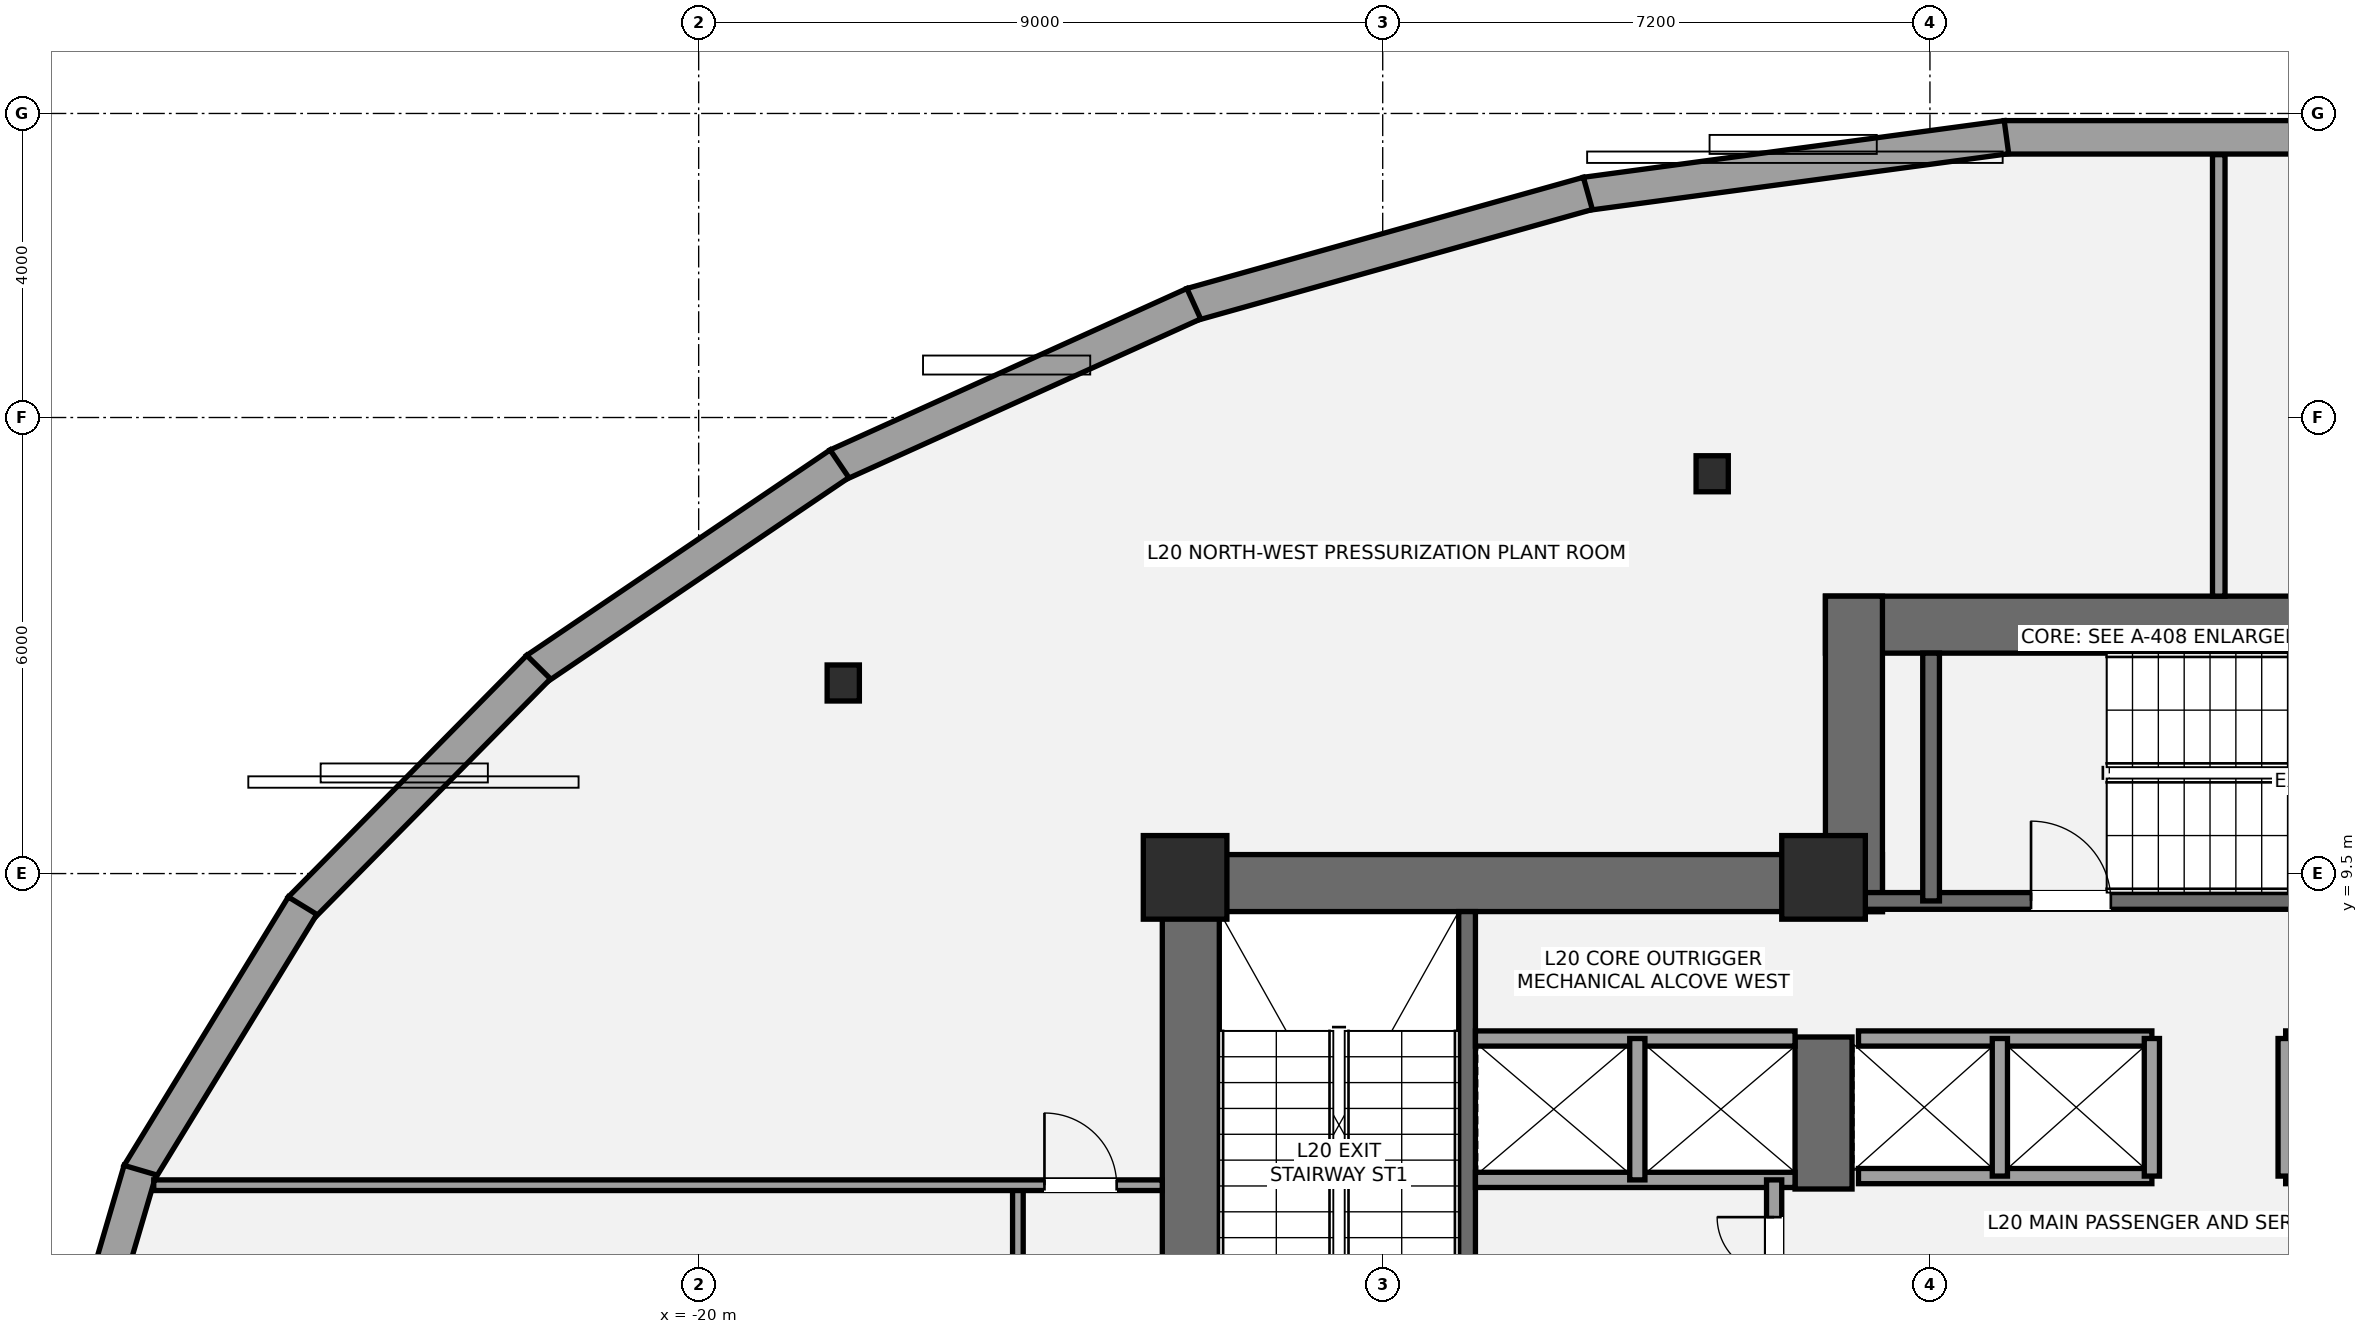
"""IFC4 building model, lengths in metres.
Left out: names, types, materials, properties, quantities, classifications, styles, units other than length and angle.
Written with IfcOpenShell. Run it as: python <this file> out.ifc"""

import sys

from ifc_helpers import new_model, si_unit, direction, frame, frame_2d, origin, origin_2d, place, context, subcontext, project, spatial, rectangle, i_section, extrude, element, fill, save


model = new_model("IFC4")
c1 = context("Model", 3, precision=1e-05, world=origin(), true_north=direction((0.0, 1.0)))
c2 = subcontext(c1, "Body", "Model", "MODEL_VIEW")
j1 = project(units=[si_unit("LENGTHUNIT", "METRE"), si_unit("PLANEANGLEUNIT", "RADIAN")], contexts=[c1])
p1 = place(None, origin())
s1 = spatial("IfcSite", under=j1, at=p1, CompositionType="ELEMENT")
p2 = place(p1, origin())
s2 = spatial("IfcBuilding", under=s1, at=p2, CompositionType="ELEMENT")
p3 = place(p2, frame((0.0, 0.0, 77.4)))
s3 = spatial("IfcBuildingStorey", under=s2, at=p3, CompositionType="ELEMENT", Elevation=77.4)
p4 = place(p3, frame((-13.525, 1.1, 0.0), z_axis=(0.0, 0.0, 1.0), x_axis=(0.0, 1.0, 0.0)))
e1 = element("IfcWall", 1, at=p4, inside=s3, PredefinedType="SHEAR", context=c2, shape_type="SweptSolid", body=[
    extrude(rectangle(XDim=8.65, YDim=0.75, at=frame_2d((4.325, 0.0))), origin(), (0.0, 0.0, 1.0), 4.5),
])
p5 = place(p3, frame((-13.9, 9.375, 0.0), z_axis=(0.0, 0.0, 1.0), x_axis=(1.0, 0.0, 0.0)))
e2 = element("IfcWall", 2, at=p5, inside=s3, PredefinedType="SHEAR", context=c2, shape_type="SweptSolid", body=[
    extrude(rectangle(XDim=9.475, YDim=0.75, at=frame_2d((4.737, 0.0))), origin(), (0.0, 0.0, 1.0), 4.5),
])
p6 = place(p3, frame((-5.2, 5.35, 0.0), z_axis=(0.0, 0.0, 1.0), x_axis=(0.0, 1.0, 0.0)))
e3 = element("IfcWall", 3, at=p6, inside=s3, PredefinedType="SHEAR", context=c2, shape_type="SweptSolid", body=[
    extrude(rectangle(XDim=2.0, YDim=0.75, at=frame_2d((1.0, 0.0))), origin(), (0.0, 0.0, 1.0), 4.5),
])
p7 = place(p3, frame((-9.89, 1.85, 0.0), z_axis=(0.0, 0.0, 1.0), x_axis=(0.0, 1.0, 0.0)))
e4 = element("IfcWall", 4, at=p7, inside=s3, PredefinedType="SHEAR", context=c2, shape_type="SweptSolid", body=[
    extrude(rectangle(XDim=7.15, YDim=0.22, at=frame_2d((3.575, 0.0))), origin(), (0.0, 0.0, 1.0), 4.5),
])
p8 = place(p3, frame((-5.175, 12.775, 0.0), z_axis=(0.0, 0.0, 1.0), x_axis=(1.0, 0.0, 0.0)))
e5 = element("IfcWall", 5, at=p8, inside=s3, PredefinedType="SHEAR", context=c2, shape_type="SweptSolid", body=[
    extrude(rectangle(XDim=10.35, YDim=0.75, at=frame_2d((5.175, 0.0))), origin(), (0.0, 0.0, 1.0), 4.5),
])
p9 = place(p3, frame((-4.8, 9.0, 0.0), z_axis=(0.0, 0.0, 1.0), x_axis=(0.0, 1.0, 0.0)))
e6 = element("IfcWall", 6, at=p9, inside=s3, PredefinedType="SHEAR", context=c2, shape_type="SweptSolid", body=[
    extrude(rectangle(XDim=4.15, YDim=0.75, at=frame_2d((2.075, 0.0))), origin(), (0.0, 0.0, 1.0), 4.5),
])
p10 = place(p3, frame((-4.7, 9.14, 0.0), z_axis=(0.0, 0.0, 1.0), x_axis=(1.0, 0.0, 0.0)))
e7 = element("IfcWall", 7, at=p10, inside=s3, PredefinedType="SHEAR", context=c2, shape_type="SweptSolid", body=[
    extrude(rectangle(XDim=9.3, YDim=0.22, at=frame_2d((4.65, 0.0))), origin(), (0.0, 0.0, 1.0), 4.5),
])
p11 = place(p10, frame((2.23, 0.0, 0.0)))
e8 = element("IfcOpeningElement", 8, at=p11, cuts=e7, PredefinedType="OPENING", context=c2, shape_type="SweptSolid", body=[
    extrude(rectangle(XDim=1.05, YDim=2.15, at=frame_2d((0.525, 1.075))), frame((0.0, 0.12, 0.0), z_axis=(0.0, -1.0, 0.0), x_axis=(1.0, 0.0, 0.0)), (0.0, 0.0, 1.0), 0.24),
])
p12 = place(p3, frame((-3.785, 9.14, 0.0), z_axis=(0.0, 0.0, 1.0), x_axis=(0.0, 1.0, 0.0)))
e9 = element("IfcWall", 9, at=p12, inside=s3, PredefinedType="SHEAR", context=c2, shape_type="SweptSolid", body=[
    extrude(rectangle(XDim=3.26, YDim=0.22, at=frame_2d((1.63, 0.0))), origin(), (0.0, 0.0, 1.0), 4.5),
])
for number, where, z_axis, x_axis in (
    (10, (-13.6, 9.45, 0.0), (0.0, 0.0, 1.0), (1.0, 0.0, 0.0)),
    (11, (-5.2, 9.45, 0.0), (0.0, 0.0, 1.0), (1.0, 0.0, 0.0)),
):
    element("IfcColumn", number, at=place(p3, frame(where, z_axis=z_axis, x_axis=x_axis)), inside=s3, PredefinedType="COLUMN", context=c2, shape_type="SweptSolid", body=[
        extrude(rectangle(XDim=1.1, YDim=1.1, at=origin_2d()), origin(), (0.0, 0.0, 1.0), 4.5),
    ])
for number, where, z_axis, x_axis in (
    (12, (-6.665, 14.76, 0.0), (0.0, 0.0, 1.0), (1.0, 0.0, 0.0)),
    (13, (-18.098, 12.007, 0.0), (0.0, 0.0, 1.0), (1.0, 0.0, 0.0)),
):
    element("IfcColumn", number, at=place(p3, frame(where, z_axis=z_axis, x_axis=x_axis)), inside=s3, PredefinedType="COLUMN", context=c2, shape_type="SweptSolid", body=[
        extrude(i_section(OverallWidth=0.424, OverallDepth=0.474, WebThickness=0.048, FlangeThickness=0.077, at=origin_2d()), origin(), (0.0, 0.0, 1.0), 4.5),
    ])
p13 = place(p3, frame((-2.823, 19.186, 0.0), z_axis=(0.0, 0.0, 1.0), x_axis=(1.0, 0.0, 0.0)))
e14 = element("IfcWall", 14, at=p13, inside=s3, PredefinedType="STANDARD", context=c2, shape_type="SweptSolid", body=[
    extrude(rectangle(XDim=5.646, YDim=0.44, at=frame_2d((2.823, 0.0))), origin(), (0.0, 0.0, 1.0), 3.498),
])
p14 = place(p3, frame((-8.331, 18.442, 0.0), z_axis=(0.0, 0.0, 1.0), x_axis=(0.9910561058, 0.133445851026, 0.0)))
e15 = element("IfcWall", 15, at=p14, inside=s3, PredefinedType="STANDARD", context=c2, shape_type="SweptSolid", body=[
    extrude(rectangle(XDim=5.587, YDim=0.44, at=frame_2d((2.794, 0.0))), origin(), (0.0, 0.0, 1.0), 3.498),
])
p15 = place(p3, frame((-13.517, 16.986, 0.0), z_axis=(0.0, 0.0, 1.0), x_axis=(0.962849260033, 0.270039446109, 0.0)))
e16 = element("IfcWall", 16, at=p15, inside=s3, PredefinedType="STANDARD", context=c2, shape_type="SweptSolid", body=[
    extrude(rectangle(XDim=5.417, YDim=0.44, at=frame_2d((2.708, 0.0))), origin(), (0.0, 0.0, 1.0), 3.498),
])
p16 = place(p3, frame((-18.18, 14.873, 0.0), z_axis=(0.0, 0.0, 1.0), x_axis=(0.911088856004, 0.412210014999, 0.0)))
e17 = element("IfcWall", 17, at=p16, inside=s3, PredefinedType="STANDARD", context=c2, shape_type="SweptSolid", body=[
    extrude(rectangle(XDim=5.152, YDim=0.44, at=frame_2d((2.576, 0.0))), origin(), (0.0, 0.0, 1.0), 3.498),
])
p17 = place(p3, frame((-22.139, 12.188, 0.0), z_axis=(0.0, 0.0, 1.0), x_axis=(0.82804003003, 0.560668983151, 0.0)))
e18 = element("IfcWall", 18, at=p17, inside=s3, PredefinedType="STANDARD", context=c2, shape_type="SweptSolid", body=[
    extrude(rectangle(XDim=4.821, YDim=0.44, at=frame_2d((2.411, 0.0))), origin(), (0.0, 0.0, 1.0), 3.498),
])
p18 = place(p3, frame((-25.243, 9.038, 0.0), z_axis=(0.0, 0.0, 1.0), x_axis=(0.702361901729, 0.711820032733, 0.0)))
e19 = element("IfcWall", 19, at=p18, inside=s3, PredefinedType="STANDARD", context=c2, shape_type="SweptSolid", body=[
    extrude(rectangle(XDim=4.466, YDim=0.44, at=frame_2d((2.233, 0.0))), origin(), (0.0, 0.0, 1.0), 3.498),
])
p19 = place(p3, frame((-27.372, 5.546, 0.0), z_axis=(0.0, 0.0, 1.0), x_axis=(0.521891226532, 0.85301204427, 0.0)))
e20 = element("IfcWall", 20, at=p19, inside=s3, PredefinedType="STANDARD", context=c2, shape_type="SweptSolid", body=[
    extrude(rectangle(XDim=4.14, YDim=0.44, at=frame_2d((2.07, 0.0))), origin(), (0.0, 0.0, 1.0), 3.498),
])
p20 = place(p3, frame((-28.45, 1.849, 0.0), z_axis=(0.0, 0.0, 1.0), x_axis=(0.281834819638, 0.959462940629, 0.0)))
e21 = element("IfcWall", 21, at=p20, inside=s3, PredefinedType="STANDARD", context=c2, shape_type="SweptSolid", body=[
    extrude(rectangle(XDim=3.908, YDim=0.44, at=frame_2d((1.954, 0.0))), origin(), (0.0, 0.0, 1.0), 3.498),
])
for number, where, z_axis, x_axis in (
    (22, (-9.78, 5.47, 0.0), (0.0, 0.0, 1.0), (1.0, 0.0, 0.0)),
    (23, (-9.78, 7.33, 0.0), (0.0, 0.0, 1.0), (1.0, 0.0, 0.0)),
):
    element("IfcWall", number, at=place(p3, frame(where, z_axis=z_axis, x_axis=x_axis)), inside=s3, PredefinedType="SOLIDWALL", context=c2, shape_type="SweptSolid", body=[
        extrude(rectangle(XDim=4.205, YDim=0.2, at=frame_2d((2.103, 0.0))), origin(), (0.0, 0.0, 1.0), 4.28),
    ])
p21 = place(p3, frame((-7.65, 5.47, 0.0), z_axis=(0.0, 0.0, 1.0), x_axis=(0.0, 1.0, 0.0)))
e24 = element("IfcWall", 24, at=p21, inside=s3, PredefinedType="SOLIDWALL", context=c2, shape_type="SweptSolid", body=[
    extrude(rectangle(XDim=1.86, YDim=0.2, at=frame_2d((0.93, 0.0))), origin(), (0.0, 0.0, 1.0), 4.28),
])
p22 = place(p3, frame((-5.85, 3.78, 0.0), z_axis=(0.0, 0.0, 1.0), x_axis=(0.0, 1.0, 0.0)))
e25 = element("IfcWall", 25, at=p22, inside=s3, PredefinedType="SOLIDWALL", context=c2, shape_type="SweptSolid", body=[
    extrude(rectangle(XDim=1.69, YDim=0.2, at=frame_2d((0.845, 0.0))), origin(), (0.0, 0.0, 1.0), 4.28),
])
p23 = place(p22, frame((0.45, 0.0, 0.0)))
e26 = element("IfcOpeningElement", 26, at=p23, cuts=e25, PredefinedType="OPENING", context=c2, shape_type="SweptSolid", body=[
    extrude(rectangle(XDim=0.75, YDim=2.1, at=frame_2d((0.375, 1.05))), frame((0.0, 0.11, 0.0), z_axis=(0.0, -1.0, 0.0), x_axis=(1.0, 0.0, 0.0)), (0.0, 0.0, 1.0), 0.22),
])
for number, where, z_axis, x_axis in (
    (27, (-4.74, 5.52, 0.0), (0.0, 0.0, 1.0), (1.0, 0.0, 0.0)),
    (28, (0.88, 5.52, 0.0), (0.0, 0.0, 1.0), (1.0, 0.0, 0.0)),
    (29, (-4.74, 7.33, 0.0), (0.0, 0.0, 1.0), (1.0, 0.0, 0.0)),
    (30, (0.88, 7.33, 0.0), (0.0, 0.0, 1.0), (1.0, 0.0, 0.0)),
):
    element("IfcWall", number, at=place(p3, frame(where, z_axis=z_axis, x_axis=x_axis)), inside=s3, PredefinedType="SOLIDWALL", context=c2, shape_type="SweptSolid", body=[
        extrude(rectangle(XDim=3.86, YDim=0.2, at=frame_2d((1.93, 0.0))), origin(), (0.0, 0.0, 1.0), 4.28),
    ])
for number, where, z_axis, x_axis in (
    (31, (-2.88, 5.52, 0.0), (0.0, 0.0, 1.0), (0.0, 1.0, 0.0)),
    (32, (-0.88, 5.52, 0.0), (0.0, 0.0, 1.0), (0.0, 1.0, 0.0)),
    (33, (0.88, 5.52, 0.0), (0.0, 0.0, 1.0), (0.0, 1.0, 0.0)),
):
    element("IfcWall", number, at=place(p3, frame(where, z_axis=z_axis, x_axis=x_axis)), inside=s3, PredefinedType="SOLIDWALL", context=c2, shape_type="SweptSolid", body=[
        extrude(rectangle(XDim=1.81, YDim=0.2, at=frame_2d((0.905, 0.0))), origin(), (0.0, 0.0, 1.0), 4.28),
    ])
p24 = place(p3, frame((-15.8, -5.8, 0.0), z_axis=(0.0, 0.0, 1.0), x_axis=(0.0, 1.0, 0.0)))
e34 = element("IfcWall", 34, at=p24, inside=s3, PredefinedType="PARTITIONING", context=c2, shape_type="SweptSolid", body=[
    extrude(rectangle(XDim=11.2, YDim=0.14, at=frame_2d((5.6, 0.0))), origin(), (0.0, 0.0, 1.0), 2.47),
])
p25 = place(p24, frame((0.35, 0.0, 0.0)))
e35 = element("IfcOpeningElement", 35, at=p25, cuts=e34, PredefinedType="OPENING", context=c2, shape_type="SweptSolid", body=[
    extrude(rectangle(XDim=0.95, YDim=2.15, at=frame_2d((0.475, 1.075))), frame((0.0, 0.08, 0.0), z_axis=(0.0, -1.0, 0.0), x_axis=(1.0, 0.0, 0.0)), (0.0, 0.0, 1.0), 0.16),
])
p26 = place(p24, frame((1.9, 0.0, 0.0)))
e36 = element("IfcOpeningElement", 36, at=p26, cuts=e34, PredefinedType="OPENING", context=c2, shape_type="SweptSolid", body=[
    extrude(rectangle(XDim=0.95, YDim=2.15, at=frame_2d((0.475, 1.075))), frame((0.0, 0.08, 0.0), z_axis=(0.0, -1.0, 0.0), x_axis=(1.0, 0.0, 0.0)), (0.0, 0.0, 1.0), 0.16),
])
p27 = place(p3, frame((-27.169, 5.4, 0.0), z_axis=(0.0, 0.0, 1.0), x_axis=(1.0, 0.0, 0.0)))
e37 = element("IfcWall", 37, at=p27, inside=s3, PredefinedType="PARTITIONING", context=c2, shape_type="SweptSolid", body=[
    extrude(rectangle(XDim=13.27, YDim=0.14, at=frame_2d((6.635, 0.0))), origin(), (0.0, 0.0, 1.0), 4.28),
])
p28 = place(p27, frame((11.719, 0.0, 0.0)))
e38 = element("IfcOpeningElement", 38, at=p28, cuts=e37, PredefinedType="OPENING", context=c2, shape_type="SweptSolid", body=[
    extrude(rectangle(XDim=0.95, YDim=2.15, at=frame_2d((0.475, 1.075))), frame((0.0, 0.08, 0.0), z_axis=(0.0, -1.0, 0.0), x_axis=(1.0, 0.0, 0.0)), (0.0, 0.0, 1.0), 0.16),
])
p29 = place(p3, frame((0.0, 13.15, 0.0), z_axis=(0.0, 0.0, 1.0), x_axis=(0.0, 1.0, 0.0)))
e39 = element("IfcWall", 39, at=p29, inside=s3, PredefinedType="PARTITIONING", context=c2, shape_type="SweptSolid", body=[
    extrude(rectangle(XDim=5.808, YDim=0.165, at=frame_2d((2.904, 0.0))), origin(), (0.0, 0.0, 1.0), 4.28),
])
p30 = place(p11, origin())
e40 = element("IfcDoor", 40, at=p30, inside=s3, OperationType="SINGLE_SWING_LEFT", PredefinedType="DOOR", context=c2, shape_type="SweptSolid", body=[
    extrude(rectangle(XDim=1.05, YDim=2.15, at=frame_2d((0.525, 1.075))), frame((0.0, 0.025, 0.0), z_axis=(0.0, -1.0, 0.0), x_axis=(1.0, 0.0, 0.0)), (0.0, 0.0, 1.0), 0.05),
])
fill(e8, e40)
p31 = place(p23, origin())
e41 = element("IfcDoor", 41, at=p31, inside=s3, OperationType="SINGLE_SWING_RIGHT", PredefinedType="DOOR", context=c2, shape_type="SweptSolid", body=[
    extrude(rectangle(XDim=0.75, YDim=2.1, at=frame_2d((0.375, 1.05))), frame((0.0, 0.025, 0.0), z_axis=(0.0, -1.0, 0.0), x_axis=(1.0, 0.0, 0.0)), (0.0, 0.0, 1.0), 0.05),
])
fill(e26, e41)
p32 = place(p28, origin())
e42 = element("IfcDoor", 42, at=p32, inside=s3, OperationType="SINGLE_SWING_LEFT", PredefinedType="DOOR", context=c2, shape_type="SweptSolid", body=[
    extrude(rectangle(XDim=0.95, YDim=2.15, at=frame_2d((0.475, 1.075))), frame((0.0, 0.025, 0.0), z_axis=(0.0, -1.0, 0.0), x_axis=(1.0, 0.0, 0.0)), (0.0, 0.0, 1.0), 0.05),
])
fill(e38, e42)
save(model, sys.argv[1])
